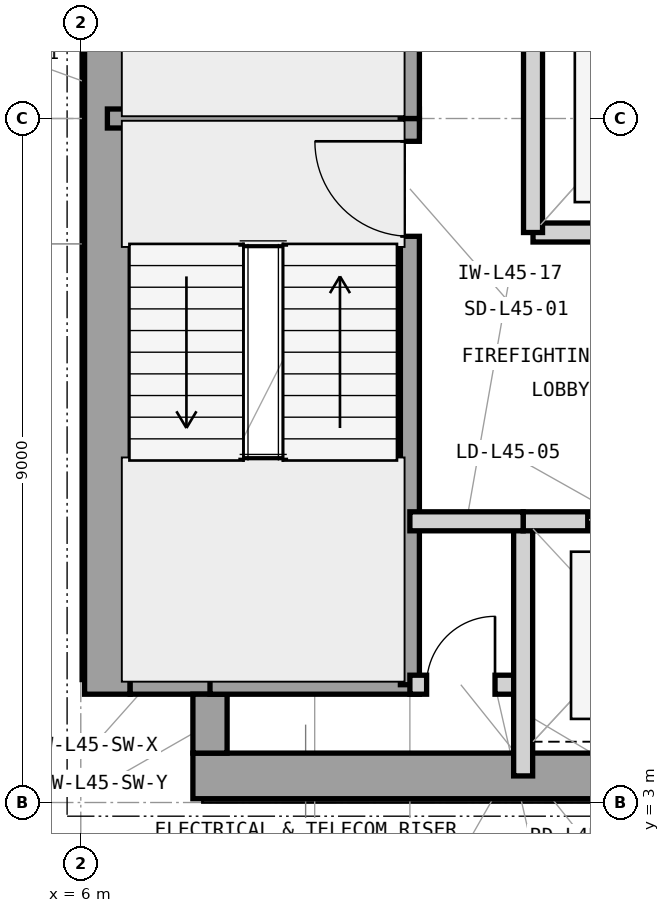
"""IFC4 building model, lengths in metres.
Left out: names, types, materials, properties, quantities, classifications, styles, units other than length and angle.
Written with IfcOpenShell. Run it as: python <this file> out.ifc"""

import sys

from ifc_helpers import new_model, si_unit, direction, frame, frame_2d, origin, place, context, subcontext, project, spatial, rectangle, extrude, element, fill, save


model = new_model("IFC4")
c1 = context("Model", 3, precision=1e-05, world=origin(), true_north=direction((0.0, 1.0)))
c2 = subcontext(c1, "Body", "Model", "MODEL_VIEW")
j1 = project(units=[si_unit("LENGTHUNIT", "METRE"), si_unit("PLANEANGLEUNIT", "RADIAN")], contexts=[c1])
p1 = place(None, origin())
s1 = spatial("IfcSite", under=j1, at=p1, CompositionType="ELEMENT")
p2 = place(p1, origin())
s2 = spatial("IfcBuilding", under=s1, at=p2, CompositionType="ELEMENT")
p3 = place(p2, frame((0.0, 0.0, 187.8)))
s3 = spatial("IfcBuildingStorey", under=s2, at=p3, CompositionType="ELEMENT", Elevation=187.8)
p4 = place(p3, frame((7.475, 3.35, 0.0), z_axis=(0.0, 0.0, 1.0), x_axis=(1.0, 0.0, 0.0)))
e1 = element("IfcWall", 1, at=p4, inside=s3, PredefinedType="SHEAR", context=c2, shape_type="SweptSolid", body=[
    extrude(rectangle(XDim=16.475, YDim=0.6, at=frame_2d((8.237, 0.0))), origin(), (0.0, 0.0, 1.0), 3.9),
])
p5 = place(p3, frame((6.35, 4.425, 0.0), z_axis=(0.0, 0.0, 1.0), x_axis=(0.0, 1.0, 0.0)))
e2 = element("IfcWall", 2, at=p5, inside=s3, PredefinedType="SHEAR", context=c2, shape_type="SweptSolid", body=[
    extrude(rectangle(XDim=15.15, YDim=0.6, at=frame_2d((7.575, 0.0))), origin(), (0.0, 0.0, 1.0), 3.9),
])
p6 = place(p3, frame((6.65, 4.65, 0.0), z_axis=(0.0, 0.0, 1.0), x_axis=(1.0, 0.0, 0.0)))
e3 = element("IfcWall", 3, at=p6, inside=s3, PredefinedType="SHEAR", context=c2, shape_type="SweptSolid", body=[
    extrude(rectangle(XDim=1.275, YDim=0.45, at=frame_2d((0.638, 0.0))), origin(), (0.0, 0.0, 1.0), 3.9),
])
p7 = place(p3, frame((7.7, 3.65, 0.0), z_axis=(0.0, 0.0, 1.0), x_axis=(0.0, 1.0, 0.0)))
e4 = element("IfcWall", 4, at=p7, inside=s3, PredefinedType="SHEAR", context=c2, shape_type="SweptSolid", body=[
    extrude(rectangle(XDim=0.775, YDim=0.45, at=frame_2d((0.388, 0.0))), origin(), (0.0, 0.0, 1.0), 3.9),
])
p8 = place(p3, frame((6.35, 12.0, 0.0), z_axis=(0.0, 0.0, 1.0), x_axis=(1.0, 0.0, 0.0)))
e5 = element("IfcWall", 5, at=p8, inside=s3, PredefinedType="SHEAR", context=c2, shape_type="SweptSolid", body=[
    extrude(rectangle(XDim=4.105, YDim=0.25, at=frame_2d((2.052, 0.0))), origin(), (0.0, 0.0, 1.0), 3.9),
])
p9 = place(p3, frame((7.7, 4.55, 0.0), z_axis=(0.0, 0.0, 1.0), x_axis=(1.0, 0.0, 0.0)))
e6 = element("IfcWall", 6, at=p9, inside=s3, PredefinedType="SHEAR", context=c2, shape_type="SweptSolid", body=[
    extrude(rectangle(XDim=2.755, YDim=0.25, at=frame_2d((1.377, 0.0))), origin(), (0.0, 0.0, 1.0), 3.9),
])
p10 = place(p3, frame((10.33, 4.55, 0.0), z_axis=(0.0, 0.0, 1.0), x_axis=(0.0, 1.0, 0.0)))
e7 = element("IfcWall", 7, at=p10, inside=s3, PredefinedType="SHEAR", context=c2, shape_type="SweptSolid", body=[
    extrude(rectangle(XDim=7.45, YDim=0.25, at=frame_2d((3.725, 0.0))), origin(), (0.0, 0.0, 1.0), 3.9),
])
p11 = place(p10, frame((5.9, 0.0, 0.0)))
e8 = element("IfcOpeningElement", 8, at=p11, cuts=e7, PredefinedType="OPENING", context=c2, shape_type="SweptSolid", body=[
    extrude(rectangle(XDim=1.25, YDim=2.2, at=frame_2d((0.625, 1.1))), frame((0.0, 0.135, 0.0), z_axis=(0.0, -1.0, 0.0), x_axis=(1.0, 0.0, 0.0)), (0.0, 0.0, 1.0), 0.27),
])
p12 = place(p3, frame((10.33, 12.0, 0.0), z_axis=(0.0, 0.0, 1.0), x_axis=(0.0, 1.0, 0.0)))
e9 = element("IfcWall", 9, at=p12, inside=s3, PredefinedType="SHEAR", context=c2, shape_type="SweptSolid", body=[
    extrude(rectangle(XDim=7.45, YDim=0.25, at=frame_2d((3.725, 0.0))), origin(), (0.0, 0.0, 1.0), 3.9),
])
p13 = place(p12, frame((5.85, 0.0, 0.0)))
e10 = element("IfcOpeningElement", 10, at=p13, cuts=e9, PredefinedType="OPENING", context=c2, shape_type="SweptSolid", body=[
    extrude(rectangle(XDim=1.25, YDim=2.2, at=frame_2d((0.625, 1.1))), frame((0.0, 0.135, 0.0), z_axis=(0.0, -1.0, 0.0), x_axis=(1.0, 0.0, 0.0)), (0.0, 0.0, 1.0), 0.27),
])
p14 = place(p3, frame((10.33, 4.55, 0.0), z_axis=(0.0, 0.0, 1.0), x_axis=(1.0, 0.0, 0.0)))
e11 = element("IfcWall", 11, at=p14, inside=s3, PredefinedType="PARTITIONING", context=c2, shape_type="SweptSolid", body=[
    extrude(rectangle(XDim=1.49, YDim=0.25, at=frame_2d((0.745, 0.0))), origin(), (0.0, 0.0, 1.0), 3.69),
])
p15 = place(p14, frame((0.22, 0.0, 0.0)))
e12 = element("IfcOpeningElement", 12, at=p15, cuts=e11, PredefinedType="OPENING", context=c2, shape_type="SweptSolid", body=[
    extrude(rectangle(XDim=0.9, YDim=2.1, at=frame_2d((0.45, 1.05))), frame((0.0, 0.135, 0.0), z_axis=(0.0, -1.0, 0.0), x_axis=(1.0, 0.0, 0.0)), (0.0, 0.0, 1.0), 0.27),
])
p16 = place(p3, frame((11.82, 3.35, 0.0), z_axis=(0.0, 0.0, 1.0), x_axis=(0.0, 1.0, 0.0)))
e13 = element("IfcWall", 13, at=p16, inside=s3, PredefinedType="PARTITIONING", context=c2, shape_type="SweptSolid", body=[
    extrude(rectangle(XDim=3.35, YDim=0.25, at=frame_2d((1.675, 0.0))), origin(), (0.0, 0.0, 1.0), 3.69),
])
p17 = place(p3, frame((11.82, 6.7, 0.0), z_axis=(0.0, 0.0, 1.0), x_axis=(1.0, 0.0, 0.0)))
e14 = element("IfcWall", 14, at=p17, inside=s3, PredefinedType="PARTITIONING", context=c2, shape_type="SweptSolid", body=[
    extrude(rectangle(XDim=2.88, YDim=0.25, at=frame_2d((1.44, 0.0))), origin(), (0.0, 0.0, 1.0), 3.283),
])
p18 = place(p17, frame((0.85, 0.0, 0.0)))
e15 = element("IfcOpeningElement", 15, at=p18, cuts=e14, PredefinedType="OPENING", context=c2, shape_type="SweptSolid", body=[
    extrude(rectangle(XDim=1.1, YDim=2.25, at=frame_2d((0.55, 1.125))), frame((0.0, 0.135, 0.0), z_axis=(0.0, -1.0, 0.0), x_axis=(1.0, 0.0, 0.0)), (0.0, 0.0, 1.0), 0.27),
])
p19 = place(p3, frame((11.95, 10.5, 0.0), z_axis=(0.0, 0.0, 1.0), x_axis=(1.0, 0.0, 0.0)))
e16 = element("IfcWall", 16, at=p19, inside=s3, PredefinedType="PARTITIONING", context=c2, shape_type="SweptSolid", body=[
    extrude(rectangle(XDim=2.75, YDim=0.25, at=frame_2d((1.375, 0.0))), origin(), (0.0, 0.0, 1.0), 3.283),
])
p20 = place(p19, frame((0.8, 0.0, 0.0)))
e17 = element("IfcOpeningElement", 17, at=p20, cuts=e16, PredefinedType="OPENING", context=c2, shape_type="SweptSolid", body=[
    extrude(rectangle(XDim=1.1, YDim=2.25, at=frame_2d((0.55, 1.125))), frame((0.0, 0.135, 0.0), z_axis=(0.0, -1.0, 0.0), x_axis=(1.0, 0.0, 0.0)), (0.0, 0.0, 1.0), 0.27),
])
p21 = place(p3, frame((11.95, 10.5, 0.0), z_axis=(0.0, 0.0, 1.0), x_axis=(0.0, 1.0, 0.0)))
e18 = element("IfcWall", 18, at=p21, inside=s3, PredefinedType="PARTITIONING", context=c2, shape_type="SweptSolid", body=[
    extrude(rectangle(XDim=3.0, YDim=0.25, at=frame_2d((1.5, 0.0))), origin(), (0.0, 0.0, 1.0), 3.69),
])
p22 = place(p3, frame((10.33, 6.7, 0.0), z_axis=(0.0, 0.0, 1.0), x_axis=(1.0, 0.0, 0.0)))
e19 = element("IfcWall", 19, at=p22, inside=s3, PredefinedType="PARTITIONING", context=c2, shape_type="SweptSolid", body=[
    extrude(rectangle(XDim=1.49, YDim=0.25, at=frame_2d((0.745, 0.0))), origin(), (0.0, 0.0, 1.0), 3.283),
])
p23 = place(p11, origin())
e20 = element("IfcDoor", 20, at=p23, inside=s3, OperationType="SINGLE_SWING_RIGHT", PredefinedType="DOOR", context=c2, shape_type="SweptSolid", body=[
    extrude(rectangle(XDim=1.25, YDim=2.2, at=frame_2d((0.625, 1.1))), frame((0.0, 0.025, 0.0), z_axis=(0.0, -1.0, 0.0), x_axis=(1.0, 0.0, 0.0)), (0.0, 0.0, 1.0), 0.05),
])
fill(e8, e20)
p24 = place(p15, origin())
e21 = element("IfcDoor", 21, at=p24, inside=s3, OperationType="SINGLE_SWING_RIGHT", PredefinedType="TRAPDOOR", context=c2, shape_type="SweptSolid", body=[
    extrude(rectangle(XDim=0.9, YDim=2.1, at=frame_2d((0.45, 1.05))), frame((0.0, 0.025, 0.0), z_axis=(0.0, -1.0, 0.0), x_axis=(1.0, 0.0, 0.0)), (0.0, 0.0, 1.0), 0.05),
])
fill(e12, e21)
p25 = place(p18, origin())
e22 = element("IfcDoor", 22, at=p25, inside=s3, OperationType="DOUBLE_DOOR_SLIDING", PredefinedType="DOOR", context=c2, shape_type="SweptSolid", body=[
    extrude(rectangle(XDim=1.1, YDim=2.25, at=frame_2d((0.55, 1.125))), frame((0.0, 0.025, 0.0), z_axis=(0.0, -1.0, 0.0), x_axis=(1.0, 0.0, 0.0)), (0.0, 0.0, 1.0), 0.05),
])
fill(e15, e22)
save(model, sys.argv[1])
